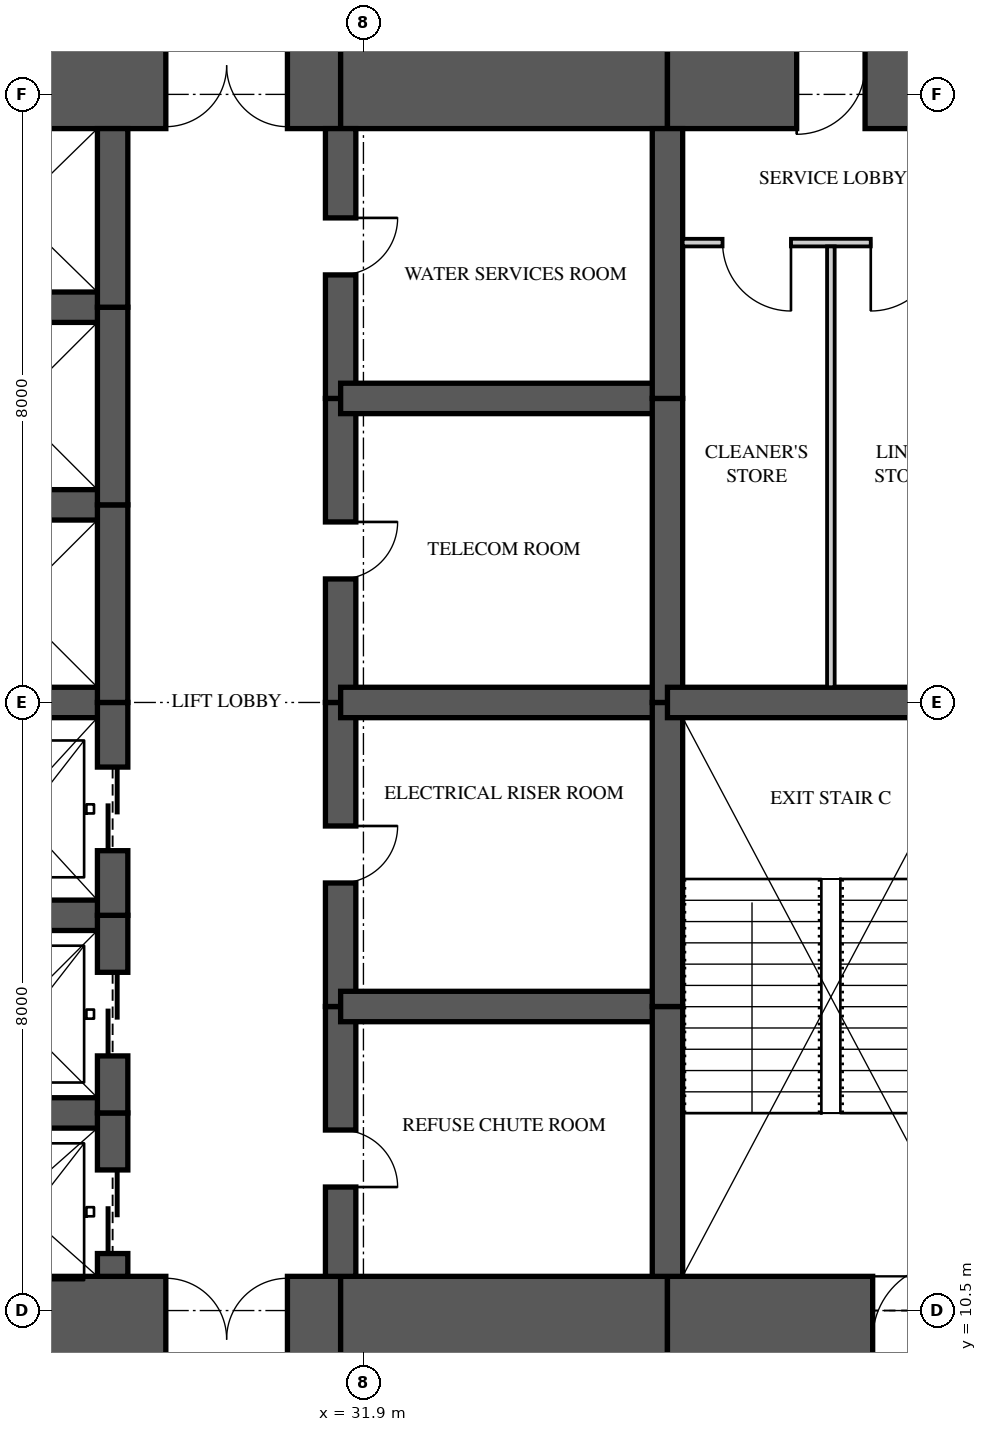
"""IFC4 building model, lengths in metres.
Left out: names, types, materials, properties, quantities, classifications, styles, units other than length and angle.
Written with IfcOpenShell. Run it as: python <this file> out.ifc"""

import sys

from ifc_helpers import new_model, si_unit, direction, frame, frame_2d, origin, place, context, subcontext, project, spatial, rectangle, extrude, element, fill, save


model = new_model("IFC4")
c1 = context("Model", 3, precision=1e-05, world=origin(), true_north=direction((0.0, 1.0)))
c2 = subcontext(c1, "Body", "Model", "MODEL_VIEW")
j1 = project(units=[si_unit("LENGTHUNIT", "METRE"), si_unit("PLANEANGLEUNIT", "RADIAN")], contexts=[c1])
p1 = place(None, origin())
s1 = spatial("IfcSite", under=j1, at=p1, CompositionType="ELEMENT")
p2 = place(p1, origin())
s2 = spatial("IfcBuilding", under=s1, at=p2, CompositionType="ELEMENT")
p3 = place(p2, frame((0.0, 0.0, 51.15)))
s3 = spatial("IfcBuildingStorey", under=s2, at=p3, CompositionType="ELEMENT", Elevation=51.15)
p4 = place(p3, frame((26.0, 10.125, 0.0), z_axis=(0.0, 0.0, 1.0), x_axis=(1.0, 0.0, 0.0)))
e1 = element("IfcWall", 1, at=p4, inside=s3, PredefinedType="SHEAR", context=c2, shape_type="SweptSolid", body=[
    extrude(rectangle(XDim=5.6, YDim=1.65, at=frame_2d((2.8, 0.0))), origin(), (0.0, 0.0, 1.0), 3.35),
])
p5 = place(p4, frame((3.3, 0.0, 0.0)))
e2 = element("IfcOpeningElement", 2, at=p5, cuts=e1, PredefinedType="OPENING", context=c2, shape_type="SweptSolid", body=[
    extrude(rectangle(XDim=1.6, YDim=2.1, at=frame_2d((0.8, 1.05))), frame((0.0, 0.835, 0.0), z_axis=(0.0, -1.0, 0.0), x_axis=(1.0, 0.0, 0.0)), (0.0, 0.0, 1.0), 1.67),
])
p6 = place(p3, frame((31.6, 10.125, 0.0), z_axis=(0.0, 0.0, 1.0), x_axis=(1.0, 0.0, 0.0)))
e3 = element("IfcWall", 3, at=p6, inside=s3, PredefinedType="SHEAR", context=c2, shape_type="SweptSolid", body=[
    extrude(rectangle(XDim=4.3, YDim=1.65, at=frame_2d((2.15, 0.0))), origin(), (0.0, 0.0, 1.0), 3.35),
])
p7 = place(p3, frame((35.9, 10.125, 0.0), z_axis=(0.0, 0.0, 1.0), x_axis=(1.0, 0.0, 0.0)))
e4 = element("IfcWall", 4, at=p7, inside=s3, PredefinedType="SHEAR", context=c2, shape_type="SweptSolid", body=[
    extrude(rectangle(XDim=8.375, YDim=1.65, at=frame_2d((4.188, 0.0))), origin(), (0.0, 0.0, 1.0), 3.35),
])
p8 = place(p7, frame((2.7, 0.0, 0.0)))
e5 = element("IfcOpeningElement", 5, at=p8, cuts=e4, PredefinedType="OPENING", context=c2, shape_type="SweptSolid", body=[
    extrude(rectangle(XDim=1.0, YDim=2.1, at=frame_2d((0.5, 1.05))), frame((0.0, 0.835, 0.0), z_axis=(0.0, -1.0, 0.0), x_axis=(1.0, 0.0, 0.0)), (0.0, 0.0, 1.0), 1.67),
])
p9 = place(p3, frame((44.275, 26.875, 0.0), z_axis=(0.0, 0.0, 1.0), x_axis=(-1.0, 0.0, 0.0)))
e6 = element("IfcWall", 6, at=p9, inside=s3, PredefinedType="SHEAR", context=c2, shape_type="SweptSolid", body=[
    extrude(rectangle(XDim=8.375, YDim=1.65, at=frame_2d((4.188, 0.0))), origin(), (0.0, 0.0, 1.0), 3.35),
])
p10 = place(p9, frame((5.775, 0.0, 0.0)))
e7 = element("IfcOpeningElement", 7, at=p10, cuts=e6, PredefinedType="OPENING", context=c2, shape_type="SweptSolid", body=[
    extrude(rectangle(XDim=0.9, YDim=2.1, at=frame_2d((0.45, 1.05))), frame((0.0, 0.835, 0.0), z_axis=(0.0, -1.0, 0.0), x_axis=(1.0, 0.0, 0.0)), (0.0, 0.0, 1.0), 1.67),
])
p11 = place(p3, frame((35.9, 26.875, 0.0), z_axis=(0.0, 0.0, 1.0), x_axis=(-1.0, 0.0, 0.0)))
e8 = element("IfcWall", 8, at=p11, inside=s3, PredefinedType="SHEAR", context=c2, shape_type="SweptSolid", body=[
    extrude(rectangle(XDim=4.3, YDim=1.65, at=frame_2d((2.15, 0.0))), origin(), (0.0, 0.0, 1.0), 3.35),
])
p12 = place(p3, frame((31.6, 26.875, 0.0), z_axis=(0.0, 0.0, 1.0), x_axis=(-1.0, 0.0, 0.0)))
e9 = element("IfcWall", 9, at=p12, inside=s3, PredefinedType="SHEAR", context=c2, shape_type="SweptSolid", body=[
    extrude(rectangle(XDim=5.6, YDim=1.65, at=frame_2d((2.8, 0.0))), origin(), (0.0, 0.0, 1.0), 3.35),
])
p13 = place(p12, frame((0.7, 0.0, 0.0)))
e10 = element("IfcOpeningElement", 10, at=p13, cuts=e9, PredefinedType="OPENING", context=c2, shape_type="SweptSolid", body=[
    extrude(rectangle(XDim=1.6, YDim=2.1, at=frame_2d((0.8, 1.05))), frame((0.0, 0.835, 0.0), z_axis=(0.0, -1.0, 0.0), x_axis=(1.0, 0.0, 0.0)), (0.0, 0.0, 1.0), 1.67),
])
p14 = place(p3, frame((28.6, 10.95, 0.0), z_axis=(0.0, 0.0, 1.0), x_axis=(0.0, 1.0, 0.0)))
e11 = element("IfcWall", 11, at=p14, inside=s3, PredefinedType="SHEAR", context=c2, shape_type="SweptSolid", body=[
    extrude(rectangle(XDim=2.15, YDim=0.4, at=frame_2d((1.075, 0.0))), origin(), (0.0, 0.0, 1.0), 3.35),
])
p15 = place(p14, frame((0.3, 0.0, 0.0)))
e12 = element("IfcOpeningElement", 12, at=p15, cuts=e11, PredefinedType="OPENING", context=c2, shape_type="SweptSolid", body=[
    extrude(rectangle(XDim=1.1, YDim=2.1, at=frame_2d((0.55, 1.05))), frame((0.0, 0.21, 0.0), z_axis=(0.0, -1.0, 0.0), x_axis=(1.0, 0.0, 0.0)), (0.0, 0.0, 1.0), 0.42),
])
p16 = place(p3, frame((28.6, 13.1, 0.0), z_axis=(0.0, 0.0, 1.0), x_axis=(0.0, 1.0, 0.0)))
e13 = element("IfcWall", 13, at=p16, inside=s3, PredefinedType="SHEAR", context=c2, shape_type="SweptSolid", body=[
    extrude(rectangle(XDim=2.6, YDim=0.4, at=frame_2d((1.3, 0.0))), origin(), (0.0, 0.0, 1.0), 3.35),
])
p17 = place(p16, frame((0.75, 0.0, 0.0)))
e14 = element("IfcOpeningElement", 14, at=p17, cuts=e13, PredefinedType="OPENING", context=c2, shape_type="SweptSolid", body=[
    extrude(rectangle(XDim=1.1, YDim=2.1, at=frame_2d((0.55, 1.05))), frame((0.0, 0.21, 0.0), z_axis=(0.0, -1.0, 0.0), x_axis=(1.0, 0.0, 0.0)), (0.0, 0.0, 1.0), 0.42),
])
p18 = place(p3, frame((28.6, 15.7, 0.0), z_axis=(0.0, 0.0, 1.0), x_axis=(0.0, 1.0, 0.0)))
e15 = element("IfcWall", 15, at=p18, inside=s3, PredefinedType="SHEAR", context=c2, shape_type="SweptSolid", body=[
    extrude(rectangle(XDim=2.8, YDim=0.4, at=frame_2d((1.4, 0.0))), origin(), (0.0, 0.0, 1.0), 3.35),
])
p19 = place(p18, frame((0.85, 0.0, 0.0)))
e16 = element("IfcOpeningElement", 16, at=p19, cuts=e15, PredefinedType="OPENING", context=c2, shape_type="SweptSolid", body=[
    extrude(rectangle(XDim=1.1, YDim=2.1, at=frame_2d((0.55, 1.05))), frame((0.0, 0.21, 0.0), z_axis=(0.0, -1.0, 0.0), x_axis=(1.0, 0.0, 0.0)), (0.0, 0.0, 1.0), 0.42),
])
p20 = place(p3, frame((28.6, 18.5, 0.0), z_axis=(0.0, 0.0, 1.0), x_axis=(0.0, 1.0, 0.0)))
e17 = element("IfcWall", 17, at=p20, inside=s3, PredefinedType="SHEAR", context=c2, shape_type="SweptSolid", body=[
    extrude(rectangle(XDim=2.6, YDim=0.4, at=frame_2d((1.3, 0.0))), origin(), (0.0, 0.0, 1.0), 3.35),
])
p21 = place(p3, frame((28.6, 21.1, 0.0), z_axis=(0.0, 0.0, 1.0), x_axis=(0.0, 1.0, 0.0)))
e18 = element("IfcWall", 18, at=p21, inside=s3, PredefinedType="SHEAR", context=c2, shape_type="SweptSolid", body=[
    extrude(rectangle(XDim=2.6, YDim=0.4, at=frame_2d((1.3, 0.0))), origin(), (0.0, 0.0, 1.0), 3.35),
])
p22 = place(p3, frame((28.6, 23.7, 0.0), z_axis=(0.0, 0.0, 1.0), x_axis=(0.0, 1.0, 0.0)))
e19 = element("IfcWall", 19, at=p22, inside=s3, PredefinedType="SHEAR", context=c2, shape_type="SweptSolid", body=[
    extrude(rectangle(XDim=2.35, YDim=0.4, at=frame_2d((1.175, 0.0))), origin(), (0.0, 0.0, 1.0), 3.35),
])
p23 = place(p3, frame((31.6, 10.95, 0.0), z_axis=(0.0, 0.0, 1.0), x_axis=(0.0, 1.0, 0.0)))
e20 = element("IfcWall", 20, at=p23, inside=s3, PredefinedType="SHEAR", context=c2, shape_type="SweptSolid", body=[
    extrude(rectangle(XDim=3.55, YDim=0.4, at=frame_2d((1.775, 0.0))), origin(), (0.0, 0.0, 1.0), 3.35),
])
p24 = place(p23, frame((1.175, 0.0, 0.0)))
e21 = element("IfcOpeningElement", 21, at=p24, cuts=e20, PredefinedType="OPENING", context=c2, shape_type="SweptSolid", body=[
    extrude(rectangle(XDim=0.75, YDim=2.1, at=frame_2d((0.375, 1.05))), frame((0.0, 0.21, 0.0), z_axis=(0.0, -1.0, 0.0), x_axis=(1.0, 0.0, 0.0)), (0.0, 0.0, 1.0), 0.42),
])
p25 = place(p3, frame((31.6, 14.5, 0.0), z_axis=(0.0, 0.0, 1.0), x_axis=(0.0, 1.0, 0.0)))
e22 = element("IfcWall", 22, at=p25, inside=s3, PredefinedType="SHEAR", context=c2, shape_type="SweptSolid", body=[
    extrude(rectangle(XDim=4.0, YDim=0.4, at=frame_2d((2.0, 0.0))), origin(), (0.0, 0.0, 1.0), 3.35),
])
p26 = place(p25, frame((1.625, 0.0, 0.0)))
e23 = element("IfcOpeningElement", 23, at=p26, cuts=e22, PredefinedType="OPENING", context=c2, shape_type="SweptSolid", body=[
    extrude(rectangle(XDim=0.75, YDim=2.1, at=frame_2d((0.375, 1.05))), frame((0.0, 0.21, 0.0), z_axis=(0.0, -1.0, 0.0), x_axis=(1.0, 0.0, 0.0)), (0.0, 0.0, 1.0), 0.42),
])
p27 = place(p3, frame((31.6, 18.5, 0.0), z_axis=(0.0, 0.0, 1.0), x_axis=(0.0, 1.0, 0.0)))
e24 = element("IfcWall", 24, at=p27, inside=s3, PredefinedType="SHEAR", context=c2, shape_type="SweptSolid", body=[
    extrude(rectangle(XDim=4.0, YDim=0.4, at=frame_2d((2.0, 0.0))), origin(), (0.0, 0.0, 1.0), 3.35),
])
p28 = place(p27, frame((1.625, 0.0, 0.0)))
e25 = element("IfcOpeningElement", 25, at=p28, cuts=e24, PredefinedType="OPENING", context=c2, shape_type="SweptSolid", body=[
    extrude(rectangle(XDim=0.75, YDim=2.1, at=frame_2d((0.375, 1.05))), frame((0.0, 0.21, 0.0), z_axis=(0.0, -1.0, 0.0), x_axis=(1.0, 0.0, 0.0)), (0.0, 0.0, 1.0), 0.42),
])
p29 = place(p3, frame((31.6, 22.5, 0.0), z_axis=(0.0, 0.0, 1.0), x_axis=(0.0, 1.0, 0.0)))
e26 = element("IfcWall", 26, at=p29, inside=s3, PredefinedType="SHEAR", context=c2, shape_type="SweptSolid", body=[
    extrude(rectangle(XDim=3.55, YDim=0.4, at=frame_2d((1.775, 0.0))), origin(), (0.0, 0.0, 1.0), 3.35),
])
p30 = place(p29, frame((1.625, 0.0, 0.0)))
e27 = element("IfcOpeningElement", 27, at=p30, cuts=e26, PredefinedType="OPENING", context=c2, shape_type="SweptSolid", body=[
    extrude(rectangle(XDim=0.75, YDim=2.1, at=frame_2d((0.375, 1.05))), frame((0.0, 0.21, 0.0), z_axis=(0.0, -1.0, 0.0), x_axis=(1.0, 0.0, 0.0)), (0.0, 0.0, 1.0), 0.42),
])
p31 = place(p3, frame((35.9, 10.95, 0.0), z_axis=(0.0, 0.0, 1.0), x_axis=(0.0, 1.0, 0.0)))
e28 = element("IfcWall", 28, at=p31, inside=s3, PredefinedType="SHEAR", context=c2, shape_type="SweptSolid", body=[
    extrude(rectangle(XDim=3.55, YDim=0.4, at=frame_2d((1.775, 0.0))), origin(), (0.0, 0.0, 1.0), 3.35),
])
for number, where, z_axis, x_axis in (
    (29, (35.9, 14.5, 0.0), (0.0, 0.0, 1.0), (0.0, 1.0, 0.0)),
    (30, (35.9, 18.5, 0.0), (0.0, 0.0, 1.0), (0.0, 1.0, 0.0)),
):
    element("IfcWall", number, at=place(p3, frame(where, z_axis=z_axis, x_axis=x_axis)), inside=s3, PredefinedType="SHEAR", context=c2, shape_type="SweptSolid", body=[
        extrude(rectangle(XDim=4.0, YDim=0.4, at=frame_2d((2.0, 0.0))), origin(), (0.0, 0.0, 1.0), 3.35),
    ])
p32 = place(p3, frame((35.9, 22.5, 0.0), z_axis=(0.0, 0.0, 1.0), x_axis=(0.0, 1.0, 0.0)))
e31 = element("IfcWall", 31, at=p32, inside=s3, PredefinedType="SHEAR", context=c2, shape_type="SweptSolid", body=[
    extrude(rectangle(XDim=3.55, YDim=0.4, at=frame_2d((1.775, 0.0))), origin(), (0.0, 0.0, 1.0), 3.35),
])
for number, where, z_axis, x_axis in (
    (32, (26.0, 13.1, 0.0), (0.0, 0.0, 1.0), (1.0, 0.0, 0.0)),
    (33, (26.0, 15.7, 0.0), (0.0, 0.0, 1.0), (1.0, 0.0, 0.0)),
    (34, (26.0, 18.5, 0.0), (0.0, 0.0, 1.0), (1.0, 0.0, 0.0)),
    (35, (26.0, 21.1, 0.0), (0.0, 0.0, 1.0), (1.0, 0.0, 0.0)),
    (36, (26.0, 23.7, 0.0), (0.0, 0.0, 1.0), (1.0, 0.0, 0.0)),
):
    element("IfcWall", number, at=place(p3, frame(where, z_axis=z_axis, x_axis=x_axis)), inside=s3, PredefinedType="SHEAR", context=c2, shape_type="SweptSolid", body=[
        extrude(rectangle(XDim=2.6, YDim=0.4, at=frame_2d((1.3, 0.0))), origin(), (0.0, 0.0, 1.0), 3.35),
    ])
for number, where, z_axis, x_axis in (
    (37, (31.6, 14.5, 0.0), (0.0, 0.0, 1.0), (1.0, 0.0, 0.0)),
    (38, (31.6, 18.5, 0.0), (0.0, 0.0, 1.0), (1.0, 0.0, 0.0)),
    (39, (31.6, 22.5, 0.0), (0.0, 0.0, 1.0), (1.0, 0.0, 0.0)),
):
    element("IfcWall", number, at=place(p3, frame(where, z_axis=z_axis, x_axis=x_axis)), inside=s3, PredefinedType="SHEAR", context=c2, shape_type="SweptSolid", body=[
        extrude(rectangle(XDim=4.3, YDim=0.4, at=frame_2d((2.15, 0.0))), origin(), (0.0, 0.0, 1.0), 3.35),
    ])
p33 = place(p3, frame((35.9, 18.5, 0.0), z_axis=(0.0, 0.0, 1.0), x_axis=(1.0, 0.0, 0.0)))
e40 = element("IfcWall", 40, at=p33, inside=s3, PredefinedType="SHEAR", context=c2, shape_type="SweptSolid", body=[
    extrude(rectangle(XDim=4.3, YDim=0.4, at=frame_2d((2.15, 0.0))), origin(), (0.0, 0.0, 1.0), 3.35),
])
p34 = place(p3, frame((36.1, 24.55, 0.0), z_axis=(0.0, 0.0, 1.0), x_axis=(1.0, 0.0, 0.0)))
e41 = element("IfcWall", 41, at=p34, inside=s3, PredefinedType="PARTITIONING", context=c2, shape_type="SweptSolid", body=[
    extrude(rectangle(XDim=3.9, YDim=0.1, at=frame_2d((1.95, 0.0))), origin(), (0.0, 0.0, 1.0), 3.11),
])
p35 = place(p34, frame((0.525, 0.0, 0.0)))
e42 = element("IfcOpeningElement", 42, at=p35, cuts=e41, PredefinedType="OPENING", context=c2, shape_type="SweptSolid", body=[
    extrude(rectangle(XDim=0.9, YDim=2.1, at=frame_2d((0.45, 1.05))), frame((0.0, 0.06, 0.0), z_axis=(0.0, -1.0, 0.0), x_axis=(1.0, 0.0, 0.0)), (0.0, 0.0, 1.0), 0.12),
])
p36 = place(p34, frame((2.475, 0.0, 0.0)))
e43 = element("IfcOpeningElement", 43, at=p36, cuts=e41, PredefinedType="OPENING", context=c2, shape_type="SweptSolid", body=[
    extrude(rectangle(XDim=0.9, YDim=2.1, at=frame_2d((0.45, 1.05))), frame((0.0, 0.06, 0.0), z_axis=(0.0, -1.0, 0.0), x_axis=(1.0, 0.0, 0.0)), (0.0, 0.0, 1.0), 0.12),
])
p37 = place(p3, frame((38.05, 18.7, 0.0), z_axis=(0.0, 0.0, 1.0), x_axis=(0.0, 1.0, 0.0)))
e44 = element("IfcWall", 44, at=p37, inside=s3, PredefinedType="PARTITIONING", context=c2, shape_type="SweptSolid", body=[
    extrude(rectangle(XDim=5.8, YDim=0.1, at=frame_2d((2.9, 0.0))), origin(), (0.0, 0.0, 1.0), 3.11),
])
p38 = place(p35, frame((0.9, 0.0, 0.0), z_axis=(0.0, 0.0, 1.0), x_axis=(-1.0, 0.0, 0.0)))
e45 = element("IfcDoor", 45, at=p38, inside=s3, OperationType="SINGLE_SWING_LEFT", PredefinedType="DOOR", context=c2, shape_type="SweptSolid", body=[
    extrude(rectangle(XDim=0.9, YDim=2.1, at=frame_2d((0.45, 1.05))), frame((0.0, 0.025, 0.0), z_axis=(0.0, -1.0, 0.0), x_axis=(1.0, 0.0, 0.0)), (0.0, 0.0, 1.0), 0.05),
])
fill(e42, e45)
p39 = place(p36, frame((0.9, 0.0, 0.0), z_axis=(0.0, 0.0, 1.0), x_axis=(-1.0, 0.0, 0.0)))
e46 = element("IfcDoor", 46, at=p39, inside=s3, OperationType="SINGLE_SWING_RIGHT", PredefinedType="DOOR", context=c2, shape_type="SweptSolid", body=[
    extrude(rectangle(XDim=0.9, YDim=2.1, at=frame_2d((0.45, 1.05))), frame((0.0, 0.025, 0.0), z_axis=(0.0, -1.0, 0.0), x_axis=(1.0, 0.0, 0.0)), (0.0, 0.0, 1.0), 0.05),
])
fill(e43, e46)
p40 = place(p15, origin())
e47 = element("IfcDoor", 47, at=p40, inside=s3, OperationType="SLIDING_TO_LEFT", PredefinedType="DOOR", context=c2, shape_type="SweptSolid", body=[
    extrude(rectangle(XDim=1.1, YDim=2.1, at=frame_2d((0.55, 1.05))), frame((0.0, 0.025, 0.0), z_axis=(0.0, -1.0, 0.0), x_axis=(1.0, 0.0, 0.0)), (0.0, 0.0, 1.0), 0.05),
])
fill(e12, e47)
p41 = place(p17, origin())
e48 = element("IfcDoor", 48, at=p41, inside=s3, OperationType="SLIDING_TO_LEFT", PredefinedType="DOOR", context=c2, shape_type="SweptSolid", body=[
    extrude(rectangle(XDim=1.1, YDim=2.1, at=frame_2d((0.55, 1.05))), frame((0.0, 0.025, 0.0), z_axis=(0.0, -1.0, 0.0), x_axis=(1.0, 0.0, 0.0)), (0.0, 0.0, 1.0), 0.05),
])
fill(e14, e48)
p42 = place(p19, origin())
e49 = element("IfcDoor", 49, at=p42, inside=s3, OperationType="SLIDING_TO_LEFT", PredefinedType="DOOR", context=c2, shape_type="SweptSolid", body=[
    extrude(rectangle(XDim=1.1, YDim=2.1, at=frame_2d((0.55, 1.05))), frame((0.0, 0.025, 0.0), z_axis=(0.0, -1.0, 0.0), x_axis=(1.0, 0.0, 0.0)), (0.0, 0.0, 1.0), 0.05),
])
fill(e16, e49)
p43 = place(p5, origin())
e50 = element("IfcDoor", 50, at=p43, inside=s3, OperationType="DOUBLE_DOOR_SINGLE_SWING", PredefinedType="DOOR", context=c2, shape_type="SweptSolid", body=[
    extrude(rectangle(XDim=1.6, YDim=2.1, at=frame_2d((0.8, 1.05))), frame((0.0, 0.025, 0.0), z_axis=(0.0, -1.0, 0.0), x_axis=(1.0, 0.0, 0.0)), (0.0, 0.0, 1.0), 0.05),
])
fill(e2, e50)
p44 = place(p13, origin())
e51 = element("IfcDoor", 51, at=p44, inside=s3, OperationType="DOUBLE_DOOR_SINGLE_SWING", PredefinedType="DOOR", context=c2, shape_type="SweptSolid", body=[
    extrude(rectangle(XDim=1.6, YDim=2.1, at=frame_2d((0.8, 1.05))), frame((0.0, 0.025, 0.0), z_axis=(0.0, -1.0, 0.0), x_axis=(1.0, 0.0, 0.0)), (0.0, 0.0, 1.0), 0.05),
])
fill(e10, e51)
p45 = place(p24, frame((0.75, 0.0, 0.0), z_axis=(0.0, 0.0, 1.0), x_axis=(-1.0, 0.0, 0.0)))
e52 = element("IfcDoor", 52, at=p45, inside=s3, OperationType="SINGLE_SWING_RIGHT", PredefinedType="DOOR", context=c2, shape_type="SweptSolid", body=[
    extrude(rectangle(XDim=0.75, YDim=2.1, at=frame_2d((0.375, 1.05))), frame((0.0, 0.025, 0.0), z_axis=(0.0, -1.0, 0.0), x_axis=(1.0, 0.0, 0.0)), (0.0, 0.0, 1.0), 0.05),
])
fill(e21, e52)
p46 = place(p26, frame((0.75, 0.0, 0.0), z_axis=(0.0, 0.0, 1.0), x_axis=(-1.0, 0.0, 0.0)))
e53 = element("IfcDoor", 53, at=p46, inside=s3, OperationType="SINGLE_SWING_LEFT", PredefinedType="DOOR", context=c2, shape_type="SweptSolid", body=[
    extrude(rectangle(XDim=0.75, YDim=2.1, at=frame_2d((0.375, 1.05))), frame((0.0, 0.025, 0.0), z_axis=(0.0, -1.0, 0.0), x_axis=(1.0, 0.0, 0.0)), (0.0, 0.0, 1.0), 0.05),
])
fill(e23, e53)
p47 = place(p28, frame((0.75, 0.0, 0.0), z_axis=(0.0, 0.0, 1.0), x_axis=(-1.0, 0.0, 0.0)))
e54 = element("IfcDoor", 54, at=p47, inside=s3, OperationType="SINGLE_SWING_LEFT", PredefinedType="DOOR", context=c2, shape_type="SweptSolid", body=[
    extrude(rectangle(XDim=0.75, YDim=2.1, at=frame_2d((0.375, 1.05))), frame((0.0, 0.025, 0.0), z_axis=(0.0, -1.0, 0.0), x_axis=(1.0, 0.0, 0.0)), (0.0, 0.0, 1.0), 0.05),
])
fill(e25, e54)
p48 = place(p30, frame((0.75, 0.0, 0.0), z_axis=(0.0, 0.0, 1.0), x_axis=(-1.0, 0.0, 0.0)))
e55 = element("IfcDoor", 55, at=p48, inside=s3, OperationType="SINGLE_SWING_LEFT", PredefinedType="DOOR", context=c2, shape_type="SweptSolid", body=[
    extrude(rectangle(XDim=0.75, YDim=2.1, at=frame_2d((0.375, 1.05))), frame((0.0, 0.025, 0.0), z_axis=(0.0, -1.0, 0.0), x_axis=(1.0, 0.0, 0.0)), (0.0, 0.0, 1.0), 0.05),
])
fill(e27, e55)
p49 = place(p8, origin())
e56 = element("IfcDoor", 56, at=p49, inside=s3, OperationType="SINGLE_SWING_RIGHT", PredefinedType="DOOR", context=c2, shape_type="SweptSolid", body=[
    extrude(rectangle(XDim=1.0, YDim=2.1, at=frame_2d((0.5, 1.05))), frame((0.0, 0.025, 0.0), z_axis=(0.0, -1.0, 0.0), x_axis=(1.0, 0.0, 0.0)), (0.0, 0.0, 1.0), 0.05),
])
fill(e5, e56)
p50 = place(p10, origin())
e57 = element("IfcDoor", 57, at=p50, inside=s3, OperationType="SINGLE_SWING_RIGHT", PredefinedType="DOOR", context=c2, shape_type="SweptSolid", body=[
    extrude(rectangle(XDim=0.9, YDim=2.1, at=frame_2d((0.45, 1.05))), frame((0.0, 0.47, 0.0), z_axis=(0.0, -1.0, 0.0), x_axis=(1.0, 0.0, 0.0)), (0.0, 0.0, 1.0), 0.8),
])
fill(e7, e57)
save(model, sys.argv[1])
